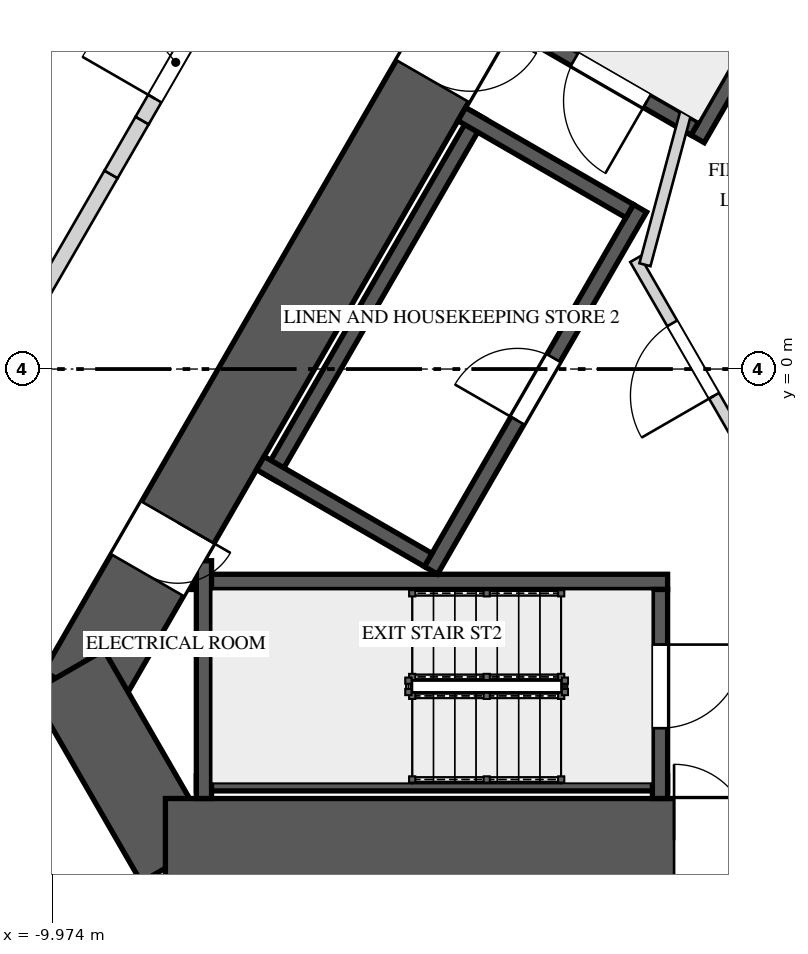
"""IFC4 building model, lengths in metres.
Left out: names, types, materials, properties, quantities, classifications, styles, units other than length and angle.
Written with IfcOpenShell. Run it as: python <this file> out.ifc"""

import sys

from ifc_helpers import new_model, si_unit, direction, frame, frame_2d, origin, place, context, subcontext, project, spatial, rectangle, extrude, element, fill, save


model = new_model("IFC4")
c1 = context("Model", 3, precision=1e-05, world=origin(), true_north=direction((0.0, 1.0)))
c2 = subcontext(c1, "Body", "Model", "MODEL_VIEW")
j1 = project(units=[si_unit("LENGTHUNIT", "METRE"), si_unit("PLANEANGLEUNIT", "RADIAN")], contexts=[c1])
p1 = place(None, origin())
s1 = spatial("IfcSite", under=j1, at=p1, CompositionType="ELEMENT")
p2 = place(p1, origin())
s2 = spatial("IfcBuilding", under=s1, at=p2, CompositionType="ELEMENT")
p3 = place(p2, frame((0.0, 0.0, 15.0)))
s3 = spatial("IfcBuildingStorey", under=s2, at=p3, CompositionType="ELEMENT", Elevation=15.0)
p4 = place(p3, frame((-1.126, 10.45, 0.0), z_axis=(0.0, 0.0, 1.0), x_axis=(-0.500001757713, -0.866024388966, 0.0)))
e1 = element("IfcWall", 1, at=p4, inside=s3, PredefinedType="SHEAR", context=c2, shape_type="SweptSolid", body=[
    extrude(rectangle(XDim=16.974, YDim=1.1, at=frame_2d((8.487, 0.0))), origin(), (0.0, 0.0, 1.0), 5.0),
])
p5 = place(p4, frame((6.692, 0.0, 0.0)))
e2 = element("IfcOpeningElement", 2, at=p5, cuts=e1, PredefinedType="OPENING", context=c2, shape_type="SweptSolid", body=[
    extrude(rectangle(XDim=1.0, YDim=2.4, at=frame_2d((0.5, 1.2))), frame((0.0, 0.56, 0.0), z_axis=(0.0, -1.0, 0.0), x_axis=(1.0, 0.0, 0.0)), (0.0, 0.0, 1.0), 1.12),
])
p6 = place(p4, frame((14.397, 0.0, 0.0)))
e3 = element("IfcOpeningElement", 3, at=p6, cuts=e1, PredefinedType="OPENING", context=c2, shape_type="SweptSolid", body=[
    extrude(rectangle(XDim=0.8, YDim=2.1, at=frame_2d((0.4, 1.05))), frame((0.0, 0.56, 0.0), z_axis=(0.0, -1.0, 0.0), x_axis=(1.0, 0.0, 0.0)), (0.0, 0.0, 1.0), 1.12),
])
p7 = place(p3, frame((-9.772, -3.975, 0.0), z_axis=(0.0, 0.0, 1.0), x_axis=(0.499995765644, -0.866027848477, 0.0)))
e4 = element("IfcWall", 4, at=p7, inside=s3, PredefinedType="SHEAR", context=c2, shape_type="SweptSolid", body=[
    extrude(rectangle(XDim=2.887, YDim=1.1, at=frame_2d((1.443, 0.0))), origin(), (0.0, 0.0, 1.0), 5.0),
])
p8 = place(p3, frame((-8.487, -6.2, 0.0), z_axis=(0.0, 0.0, 1.0), x_axis=(1.0, 0.0, 0.0)))
e5 = element("IfcWall", 5, at=p8, inside=s3, PredefinedType="SHEAR", context=c2, shape_type="SweptSolid", body=[
    extrude(rectangle(XDim=16.974, YDim=1.1, at=frame_2d((8.487, 0.0))), origin(), (0.0, 0.0, 1.0), 5.0),
])
p9 = place(p8, frame((6.692, 0.0, 0.0)))
e6 = element("IfcOpeningElement", 6, at=p9, cuts=e5, PredefinedType="OPENING", context=c2, shape_type="SweptSolid", body=[
    extrude(rectangle(XDim=1.0, YDim=2.4, at=frame_2d((0.5, 1.2))), frame((0.0, 0.56, 0.0), z_axis=(0.0, -1.0, 0.0), x_axis=(1.0, 0.0, 0.0)), (0.0, 0.0, 1.0), 1.12),
])
p10 = place(p3, frame((1.646, 8.45, 0.0), z_axis=(0.0, 0.0, 1.0), x_axis=(-0.500006002103, -0.866021938441, 0.0)))
e7 = element("IfcWall", 7, at=p10, inside=s3, PredefinedType="SOLIDWALL", context=c2, shape_type="SweptSolid", body=[
    extrude(rectangle(XDim=6.261, YDim=0.2, at=frame_2d((3.13, 0.0))), origin(), (0.0, 0.0, 1.0), 4.65),
])
p11 = place(p3, frame((-1.521, 3.165, 0.0), z_axis=(0.0, 0.0, 1.0), x_axis=(-0.866027397988, 0.499996545922, 0.0)))
e8 = element("IfcWall", 8, at=p11, inside=s3, PredefinedType="SOLIDWALL", context=c2, shape_type="SweptSolid", body=[
    extrude(rectangle(XDim=2.75, YDim=0.2, at=frame_2d((1.375, 0.0))), origin(), (0.0, 0.0, 1.0), 4.65),
])
p12 = place(p11, frame((0.725, 0.0, 0.0)))
e9 = element("IfcOpeningElement", 9, at=p12, cuts=e8, PredefinedType="OPENING", context=c2, shape_type="SweptSolid", body=[
    extrude(rectangle(XDim=1.1, YDim=2.4, at=frame_2d((0.55, 1.2))), frame((0.0, 0.11, 0.0), z_axis=(0.0, -1.0, 0.0), x_axis=(1.0, 0.0, 0.0)), (0.0, 0.0, 1.0), 0.22),
])
p13 = place(p3, frame((-8.08, -5.45, 0.0), z_axis=(0.0, 0.0, 1.0), x_axis=(1.0, 0.0, 0.0)))
e10 = element("IfcWall", 10, at=p13, inside=s3, PredefinedType="SOLIDWALL", context=c2, shape_type="SweptSolid", body=[
    extrude(rectangle(XDim=6.2, YDim=0.2, at=frame_2d((3.1, 0.0))), origin(), (0.0, 0.0, 1.0), 4.65),
])
p14 = place(p3, frame((-8.141, -2.8, 0.0), z_axis=(0.0, 0.0, 1.0), x_axis=(1.0, 0.0, 0.0)))
e11 = element("IfcWall", 11, at=p14, inside=s3, PredefinedType="SOLIDWALL", context=c2, shape_type="SweptSolid", body=[
    extrude(rectangle(XDim=6.261, YDim=0.2, at=frame_2d((3.13, 0.0))), origin(), (0.0, 0.0, 1.0), 4.65),
])
p15 = place(p3, frame((-7.98, -2.522, 0.0), z_axis=(0.0, 0.0, 1.0), x_axis=(0.0, -1.0, 0.0)))
e12 = element("IfcWall", 12, at=p15, inside=s3, PredefinedType="SOLIDWALL", context=c2, shape_type="SweptSolid", body=[
    extrude(rectangle(XDim=3.128, YDim=0.2, at=frame_2d((1.564, 0.0))), origin(), (0.0, 0.0, 1.0), 4.65),
])
p16 = place(p3, frame((-1.98, -2.9, 0.0), z_axis=(0.0, 0.0, 1.0), x_axis=(0.0, -1.0, 0.0)))
e13 = element("IfcWall", 13, at=p16, inside=s3, PredefinedType="SOLIDWALL", context=c2, shape_type="SweptSolid", body=[
    extrude(rectangle(XDim=2.75, YDim=0.2, at=frame_2d((1.375, 0.0))), origin(), (0.0, 0.0, 1.0), 4.65),
])
p17 = place(p16, frame((0.725, 0.0, 0.0)))
e14 = element("IfcOpeningElement", 14, at=p17, cuts=e13, PredefinedType="OPENING", context=c2, shape_type="SweptSolid", body=[
    extrude(rectangle(XDim=1.1, YDim=2.4, at=frame_2d((0.55, 1.2))), frame((0.0, 0.11, 0.0), z_axis=(0.0, -1.0, 0.0), x_axis=(1.0, 0.0, 0.0)), (0.0, 0.0, 1.0), 0.22),
])
p18 = place(p3, frame((-4.993, -2.648, 0.0), z_axis=(0.0, 0.0, 1.0), x_axis=(0.499996545922, 0.866027397988, 0.0)))
e15 = element("IfcWall", 15, at=p18, inside=s3, PredefinedType="SOLIDWALL", context=c2, shape_type="SweptSolid", body=[
    extrude(rectangle(XDim=5.5, YDim=0.2, at=frame_2d((2.75, 0.0))), origin(), (0.0, 0.0, 1.0), 4.65),
])
p19 = place(p18, frame((2.275, 0.0, 0.0)))
e16 = element("IfcOpeningElement", 16, at=p19, cuts=e15, PredefinedType="OPENING", context=c2, shape_type="SweptSolid", body=[
    extrude(rectangle(XDim=0.95, YDim=2.4, at=frame_2d((0.475, 1.2))), frame((0.0, 0.11, 0.0), z_axis=(0.0, -1.0, 0.0), x_axis=(1.0, 0.0, 0.0)), (0.0, 0.0, 1.0), 0.22),
])
p20 = place(p3, frame((-4.365, 3.34, 0.0), z_axis=(0.0, 0.0, 1.0), x_axis=(-0.499996545922, -0.866027397988, 0.0)))
e17 = element("IfcWall", 17, at=p20, inside=s3, PredefinedType="SOLIDWALL", context=c2, shape_type="SweptSolid", body=[
    extrude(rectangle(XDim=5.5, YDim=0.2, at=frame_2d((2.75, 0.0))), origin(), (0.0, 0.0, 1.0), 4.65),
])
for number, where, z_axis, x_axis in (
    (18, (-2.38, 2.078, 0.0), (0.0, 0.0, 1.0), (-0.866, 0.5, 0.0)),
    (19, (-5.03, -2.512, 0.0), (0.0, 0.0, 1.0), (-0.866, 0.5, 0.0)),
):
    element("IfcWall", number, at=place(p3, frame(where, z_axis=z_axis, x_axis=x_axis)), inside=s3, PredefinedType="SOLIDWALL", context=c2, shape_type="SweptSolid", body=[
        extrude(rectangle(XDim=2.55, YDim=0.2, at=frame_2d((1.275, 0.0))), origin(), (0.0, 0.0, 1.0), 4.65),
    ])
p21 = place(p3, frame((-0.744, -1.261, 0.0), z_axis=(0.0, 0.0, 1.0), x_axis=(-0.500004234368, 0.866022959057, 0.0)))
e20 = element("IfcWall", 20, at=p21, inside=s3, PredefinedType="PARTITIONING", context=c2, shape_type="SweptSolid", body=[
    extrude(rectangle(XDim=3.125, YDim=0.15, at=frame_2d((1.562, 0.0))), origin(), (0.0, 0.0, 1.0), 4.65),
])
p22 = place(p21, frame((1.05, 0.0, 0.0)))
e21 = element("IfcOpeningElement", 21, at=p22, cuts=e20, PredefinedType="OPENING", context=c2, shape_type="SweptSolid", body=[
    extrude(rectangle(XDim=1.1, YDim=2.4, at=frame_2d((0.55, 1.2))), frame((0.0, 0.085, 0.0), z_axis=(0.0, -1.0, 0.0), x_axis=(1.0, 0.0, 0.0)), (0.0, 0.0, 1.0), 0.17),
])
p23 = place(p3, frame((-2.178, 1.372, 0.0), z_axis=(0.0, 0.0, 1.0), x_axis=(0.258808958833, 0.96592852884, 0.0)))
e22 = element("IfcWall", 22, at=p23, inside=s3, PredefinedType="PARTITIONING", context=c2, shape_type="SweptSolid", body=[
    extrude(rectangle(XDim=2.903, YDim=0.15, at=frame_2d((1.451, 0.0))), origin(), (0.0, 0.0, 1.0), 4.65),
])
p24 = place(p3, frame((-1.51, 4.215, 0.0), z_axis=(0.0, 0.0, 1.0), x_axis=(0.866085525409, 0.49989585183, 0.0)))
e23 = element("IfcWall", 23, at=p24, inside=s3, PredefinedType="PARTITIONING", context=c2, shape_type="SweptSolid", body=[
    extrude(rectangle(XDim=1.3, YDim=0.15, at=frame_2d((0.65, 0.0))), origin(), (0.0, 0.0, 1.0), 4.65),
])
p25 = place(p3, frame((-10.734, -0.093, 0.0), z_axis=(0.0, 0.0, 1.0), x_axis=(0.499952348839, 0.866052913447, 0.0)))
e24 = element("IfcWall", 24, at=p25, inside=s3, PredefinedType="SOLIDWALL", context=c2, shape_type="SweptSolid", body=[
    extrude(rectangle(XDim=3.064, YDim=0.2, at=frame_2d((1.532, 0.0))), origin(), (0.0, 0.0, 1.0), 4.65),
])
p26 = place(p3, frame((-9.202, 2.561, 0.0), z_axis=(0.0, 0.0, 1.0), x_axis=(0.500118501653, 0.865956976012, 0.0)))
e25 = element("IfcWall", 25, at=p26, inside=s3, PredefinedType="SOLIDWALL", context=c2, shape_type="SweptSolid", body=[
    extrude(rectangle(XDim=0.818, YDim=0.2, at=frame_2d((0.409, 0.0))), origin(), (0.0, 0.0, 1.0), 3.75),
])
p27 = place(p3, frame((-8.793, 3.27, 0.0), z_axis=(0.0, 0.0, 1.0), x_axis=(0.499947505232, 0.866055709532, 0.0)))
e26 = element("IfcWall", 26, at=p27, inside=s3, PredefinedType="SOLIDWALL", context=c2, shape_type="SweptSolid", body=[
    extrude(rectangle(XDim=3.13, YDim=0.2, at=frame_2d((1.565, 0.0))), origin(), (0.0, 0.0, 1.0), 4.65),
])
p28 = place(p27, frame((0.333, 0.0, 0.0)))
e27 = element("IfcOpeningElement", 27, at=p28, cuts=e26, PredefinedType="OPENING", context=c2, shape_type="SweptSolid", body=[
    extrude(rectangle(XDim=1.1, YDim=2.4, at=frame_2d((0.55, 1.2))), frame((0.0, 0.11, 0.0), z_axis=(0.0, -1.0, 0.0), x_axis=(1.0, 0.0, 0.0)), (0.0, 0.0, 1.0), 0.22),
])
p29 = place(p12, origin())
e28 = element("IfcDoor", 28, at=p29, inside=s3, OperationType="SINGLE_SWING_RIGHT", PredefinedType="DOOR", context=c2, shape_type="SweptSolid", body=[
    extrude(rectangle(XDim=1.1, YDim=2.4, at=frame_2d((0.55, 1.2))), frame((0.0, 0.025, 0.0), z_axis=(0.0, -1.0, 0.0), x_axis=(1.0, 0.0, 0.0)), (0.0, 0.0, 1.0), 0.05),
])
fill(e9, e28)
p30 = place(p17, origin())
e29 = element("IfcDoor", 29, at=p30, inside=s3, OperationType="SINGLE_SWING_LEFT", PredefinedType="DOOR", context=c2, shape_type="SweptSolid", body=[
    extrude(rectangle(XDim=1.1, YDim=2.4, at=frame_2d((0.55, 1.2))), frame((0.0, 0.025, 0.0), z_axis=(0.0, -1.0, 0.0), x_axis=(1.0, 0.0, 0.0)), (0.0, 0.0, 1.0), 0.05),
])
fill(e14, e29)
p31 = place(p19, origin())
e30 = element("IfcDoor", 30, at=p31, inside=s3, OperationType="SINGLE_SWING_LEFT", PredefinedType="DOOR", context=c2, shape_type="SweptSolid", body=[
    extrude(rectangle(XDim=0.95, YDim=2.4, at=frame_2d((0.475, 1.2))), frame((0.0, 0.025, 0.0), z_axis=(0.0, -1.0, 0.0), x_axis=(1.0, 0.0, 0.0)), (0.0, 0.0, 1.0), 0.05),
])
fill(e16, e30)
p32 = place(p22, origin())
e31 = element("IfcDoor", 31, at=p32, inside=s3, OperationType="SINGLE_SWING_RIGHT", PredefinedType="DOOR", context=c2, shape_type="SweptSolid", body=[
    extrude(rectangle(XDim=1.1, YDim=2.4, at=frame_2d((0.55, 1.2))), frame((0.0, 0.025, 0.0), z_axis=(0.0, -1.0, 0.0), x_axis=(1.0, 0.0, 0.0)), (0.0, 0.0, 1.0), 0.05),
])
fill(e21, e31)
p33 = place(p5, origin())
e32 = element("IfcDoor", 32, at=p33, inside=s3, OperationType="SINGLE_SWING_LEFT", PredefinedType="DOOR", context=c2, shape_type="SweptSolid", body=[
    extrude(rectangle(XDim=1.0, YDim=2.4, at=frame_2d((0.5, 1.2))), frame((0.0, 0.025, 0.0), z_axis=(0.0, -1.0, 0.0), x_axis=(1.0, 0.0, 0.0)), (0.0, 0.0, 1.0), 0.05),
])
fill(e2, e32)
p34 = place(p9, origin())
e33 = element("IfcDoor", 33, at=p34, inside=s3, OperationType="SINGLE_SWING_RIGHT", PredefinedType="DOOR", context=c2, shape_type="SweptSolid", body=[
    extrude(rectangle(XDim=1.0, YDim=2.4, at=frame_2d((0.5, 1.2))), frame((0.0, 0.025, 0.0), z_axis=(0.0, -1.0, 0.0), x_axis=(1.0, 0.0, 0.0)), (0.0, 0.0, 1.0), 0.05),
])
fill(e6, e33)
p35 = place(p6, origin())
e34 = element("IfcDoor", 34, at=p35, inside=s3, OperationType="SINGLE_SWING_RIGHT", PredefinedType="DOOR", context=c2, shape_type="SweptSolid", body=[
    extrude(rectangle(XDim=0.8, YDim=2.1, at=frame_2d((0.4, 1.05))), frame((0.0, 0.025, 0.0), z_axis=(0.0, -1.0, 0.0), x_axis=(1.0, 0.0, 0.0)), (0.0, 0.0, 1.0), 0.05),
])
fill(e3, e34)
p36 = place(p28, origin())
e35 = element("IfcDoor", 35, at=p36, inside=s3, OperationType="SINGLE_SWING_RIGHT", PredefinedType="DOOR", context=c2, shape_type="SweptSolid", body=[
    extrude(rectangle(XDim=1.1, YDim=2.4, at=frame_2d((0.55, 1.2))), frame((0.0, 0.025, 0.0), z_axis=(0.0, -1.0, 0.0), x_axis=(1.0, 0.0, 0.0)), (0.0, 0.0, 1.0), 0.05),
])
fill(e27, e35)
save(model, sys.argv[1])
